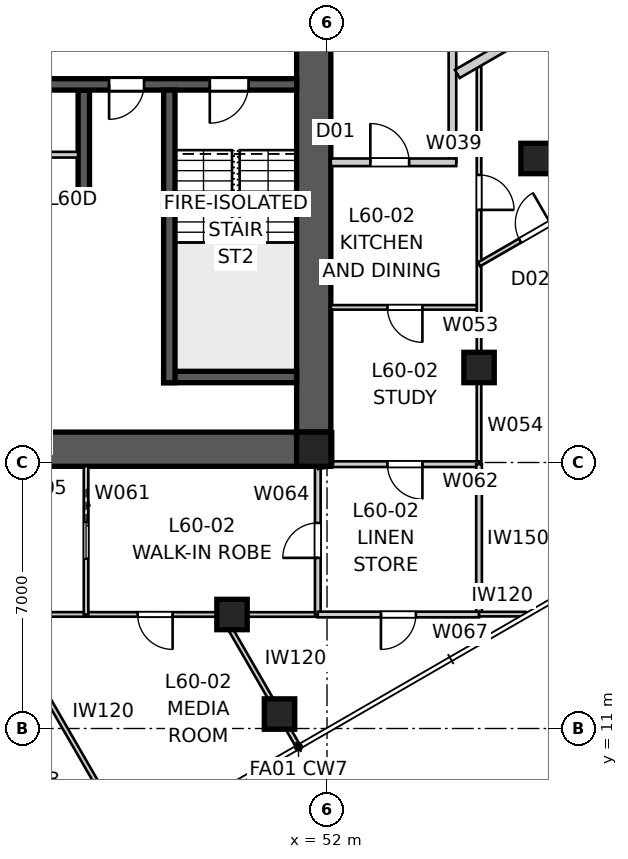
"""IFC4 building model, lengths in metres.
Left out: names, types, materials, properties, quantities, classifications, styles, units other than length and angle.
Written with IfcOpenShell. Run it as: python <this file> out.ifc"""

import sys

from ifc_helpers import new_model, si_unit, direction, frame, frame_2d, origin, origin_2d, place, context, subcontext, project, spatial, polyline, rectangle, outline, extrude, element, fill, save


model = new_model("IFC4")
c1 = context("Model", 3, precision=1e-05, world=origin(), true_north=direction((0.0, 1.0)))
c2 = subcontext(c1, "Body", "Model", "MODEL_VIEW")
j1 = project(units=[si_unit("LENGTHUNIT", "METRE"), si_unit("PLANEANGLEUNIT", "RADIAN")], contexts=[c1])
p1 = place(None, origin())
s1 = spatial("IfcSite", under=j1, at=p1, CompositionType="ELEMENT")
p2 = place(p1, origin())
s2 = spatial("IfcBuilding", under=s1, at=p2, CompositionType="ELEMENT")
p3 = place(p2, frame((0.0, 0.0, 218.4)))
s3 = spatial("IfcBuildingStorey", under=s2, at=p3, CompositionType="ELEMENT", Elevation=218.4)
p4 = place(p3, frame((51.2, 18.35, 0.0), z_axis=(0.0, 0.0, 1.0), x_axis=(-1.0, 0.0, 0.0)))
e1 = element("IfcWall", 1, at=p4, inside=s3, PredefinedType="SHEAR", context=c2, shape_type="SweptSolid", body=[
    extrude(outline(polyline([(0.0, -0.45), (22.4, -0.45), (22.4, -0.025), (22.85, -0.025), (22.85, 0.025), (22.4, 0.025), (22.4, 0.45), (0.0, 0.45), (0.0, 0.025), (-0.45, 0.025), (-0.45, -0.025), (0.0, -0.025), (0.0, -0.45)])), origin(), (0.0, 0.0, 1.0), 3.4),
])
p5 = place(p3, frame((51.65, 18.8, 0.0), z_axis=(0.0, 0.0, 1.0), x_axis=(0.0, 1.0, 0.0)))
e2 = element("IfcWall", 2, at=p5, inside=s3, PredefinedType="SHEAR", context=c2, shape_type="SweptSolid", body=[
    extrude(outline(polyline([(0.0, -0.45), (22.4, -0.45), (22.4, -0.025), (22.85, -0.025), (22.85, 0.025), (22.4, 0.025), (22.4, 0.45), (0.0, 0.45), (0.0, 0.025), (-0.45, 0.025), (-0.45, -0.025), (0.0, -0.025), (0.0, -0.45)])), origin(), (0.0, 0.0, 1.0), 3.4),
])
p6 = place(p5, frame((11.14, 0.0, 0.0)))
e3 = element("IfcOpeningElement", 3, at=p6, cuts=e2, PredefinedType="OPENING", context=c2, shape_type="SweptSolid", body=[
    extrude(rectangle(XDim=1.02, YDim=2.4, at=frame_2d((0.51, 1.2))), frame((0.0, 0.46, 0.0), z_axis=(0.0, -1.0, 0.0), x_axis=(1.0, 0.0, 0.0)), (0.0, 0.0, 1.0), 0.92),
])
p7 = place(p3, frame((51.2, 27.95, 0.0), z_axis=(0.0, 0.0, 1.0), x_axis=(-1.0, 0.0, 0.0)))
e4 = element("IfcWall", 4, at=p7, inside=s3, PredefinedType="SHEAR", context=c2, shape_type="SweptSolid", body=[
    extrude(rectangle(XDim=22.4, YDim=0.3, at=frame_2d((11.2, 0.0))), origin(), (0.0, 0.0, 1.0), 3.4),
])
p8 = place(p7, frame((19.04, 0.0, 0.0)))
e5 = element("IfcOpeningElement", 5, at=p8, cuts=e4, PredefinedType="OPENING", context=c2, shape_type="SweptSolid", body=[
    extrude(rectangle(XDim=0.92, YDim=2.1, at=frame_2d((0.46, 1.05))), frame((0.0, 0.16, 0.0), z_axis=(0.0, -1.0, 0.0), x_axis=(1.0, 0.0, 0.0)), (0.0, 0.0, 1.0), 0.32),
])
p9 = place(p7, frame((1.265, 0.0, 0.0)))
e6 = element("IfcOpeningElement", 6, at=p9, cuts=e4, PredefinedType="OPENING", context=c2, shape_type="SweptSolid", body=[
    extrude(rectangle(XDim=1.02, YDim=2.1, at=frame_2d((0.51, 1.05))), frame((0.0, 0.16, 0.0), z_axis=(0.0, -1.0, 0.0), x_axis=(1.0, 0.0, 0.0)), (0.0, 0.0, 1.0), 0.32),
])
p10 = place(p7, frame((4.015, 0.0, 0.0)))
e7 = element("IfcOpeningElement", 7, at=p10, cuts=e4, PredefinedType="OPENING", context=c2, shape_type="SweptSolid", body=[
    extrude(rectangle(XDim=0.92, YDim=2.1, at=frame_2d((0.46, 1.05))), frame((0.0, 0.16, 0.0), z_axis=(0.0, -1.0, 0.0), x_axis=(1.0, 0.0, 0.0)), (0.0, 0.0, 1.0), 0.32),
])
p11 = place(p7, frame((8.89, 0.0, 0.0)))
e8 = element("IfcOpeningElement", 8, at=p11, cuts=e4, PredefinedType="OPENING", context=c2, shape_type="SweptSolid", body=[
    extrude(rectangle(XDim=0.92, YDim=2.1, at=frame_2d((0.46, 1.05))), frame((0.0, 0.16, 0.0), z_axis=(0.0, -1.0, 0.0), x_axis=(1.0, 0.0, 0.0)), (0.0, 0.0, 1.0), 0.32),
])
p12 = place(p7, frame((6.565, 0.0, 0.0)))
e9 = element("IfcOpeningElement", 9, at=p12, cuts=e4, PredefinedType="OPENING", context=c2, shape_type="SweptSolid", body=[
    extrude(rectangle(XDim=0.92, YDim=2.1, at=frame_2d((0.46, 1.05))), frame((0.0, 0.16, 0.0), z_axis=(0.0, -1.0, 0.0), x_axis=(1.0, 0.0, 0.0)), (0.0, 0.0, 1.0), 0.32),
])
p13 = place(p7, frame((12.05, 0.0, 0.0)))
e10 = element("IfcOpeningElement", 10, at=p13, cuts=e4, PredefinedType="OPENING", context=c2, shape_type="SweptSolid", body=[
    extrude(rectangle(XDim=1.1, YDim=2.1, at=frame_2d((0.55, 1.05))), frame((0.0, 0.16, 0.0), z_axis=(0.0, -1.0, 0.0), x_axis=(1.0, 0.0, 0.0)), (0.0, 0.0, 1.0), 0.32),
])
p14 = place(p7, frame((14.85, 0.0, 0.0)))
e11 = element("IfcOpeningElement", 11, at=p14, cuts=e4, PredefinedType="OPENING", context=c2, shape_type="SweptSolid", body=[
    extrude(rectangle(XDim=1.1, YDim=2.1, at=frame_2d((0.55, 1.05))), frame((0.0, 0.16, 0.0), z_axis=(0.0, -1.0, 0.0), x_axis=(1.0, 0.0, 0.0)), (0.0, 0.0, 1.0), 0.32),
])
p15 = place(p3, frame((45.75, 24.85, 0.0), z_axis=(0.0, 0.0, 1.0), x_axis=(-1.0, 0.0, 0.0)))
e12 = element("IfcWall", 12, at=p15, inside=s3, PredefinedType="SHEAR", context=c2, shape_type="SweptSolid", body=[
    extrude(rectangle(XDim=11.5, YDim=0.3, at=frame_2d((5.75, 0.0))), origin(), (0.0, 0.0, 1.0), 3.4),
])
p16 = place(p3, frame((45.6, 27.8, 0.0), z_axis=(0.0, 0.0, 1.0), x_axis=(0.0, -1.0, 0.0)))
e13 = element("IfcWall", 13, at=p16, inside=s3, PredefinedType="SHEAR", context=c2, shape_type="SweptSolid", body=[
    extrude(rectangle(XDim=2.8, YDim=0.3, at=frame_2d((1.4, 0.0))), origin(), (0.0, 0.0, 1.0), 3.4),
])
p17 = place(p3, frame((47.85, 27.8, 0.0), z_axis=(0.0, 0.0, 1.0), x_axis=(0.0, -1.0, 0.0)))
e14 = element("IfcWall", 14, at=p17, inside=s3, PredefinedType="SHEAR", context=c2, shape_type="SweptSolid", body=[
    extrude(rectangle(XDim=7.7, YDim=0.3, at=frame_2d((3.85, 0.0))), origin(), (0.0, 0.0, 1.0), 3.4),
])
p18 = place(p3, frame((51.2, 20.25, 0.0), z_axis=(0.0, 0.0, 1.0), x_axis=(-1.0, 0.0, 0.0)))
e15 = element("IfcWall", 15, at=p18, inside=s3, PredefinedType="SHEAR", context=c2, shape_type="SweptSolid", body=[
    extrude(rectangle(XDim=3.5, YDim=0.3, at=frame_2d((1.75, 0.0))), origin(), (0.0, 0.0, 1.0), 3.4),
])
p19 = place(p3, frame((51.65, 18.35, 0.0), z_axis=(0.0, 0.0, 1.0), x_axis=(1.0, 0.0, 0.0)))
e16 = element("IfcColumn", 16, at=p19, inside=s3, PredefinedType="COLUMN", context=c2, shape_type="SweptSolid", body=[
    extrude(rectangle(XDim=0.9, YDim=0.9, at=origin_2d()), origin(), (0.0, 0.0, 1.0), 3.4),
])
for number, where, z_axis, x_axis in (
    (17, (50.75, 11.38, 0.0), (0.0, 0.0, 1.0), (1.0, 0.0, 0.0)),
    (18, (57.5, 26.0, 0.0), (0.0, 0.0, 1.0), (1.0, 0.0, 0.0)),
    (19, (49.5, 14.0, 0.0), (0.0, 0.0, 1.0), (1.0, 0.0, 0.0)),
    (20, (56.0, 20.5, 0.0), (0.0, 0.0, 1.0), (1.0, 0.0, 0.0)),
):
    element("IfcColumn", number, at=place(p3, frame(where, z_axis=z_axis, x_axis=x_axis)), inside=s3, PredefinedType="COLUMN", context=c2, shape_type="SweptSolid", body=[
        extrude(rectangle(XDim=0.8, YDim=0.8, at=origin_2d()), origin(), (0.0, 0.0, 1.0), 3.4),
    ])
p20 = place(p3, frame((55.3, 25.9, 0.0), z_axis=(0.0, 0.0, 1.0), x_axis=(0.0, 1.0, 0.0)))
e21 = element("IfcWall", 21, at=p20, inside=s3, PredefinedType="PARTITIONING", context=c2, shape_type="SweptSolid", body=[
    extrude(rectangle(XDim=8.2, YDim=0.2, at=frame_2d((4.1, 0.0))), origin(), (0.0, 0.0, 1.0), 3.25),
])
p21 = place(p3, frame((52.1, 25.9, 0.0), z_axis=(0.0, 0.0, 1.0), x_axis=(1.0, 0.0, 0.0)))
e22 = element("IfcWall", 22, at=p21, inside=s3, PredefinedType="PARTITIONING", context=c2, shape_type="SweptSolid", body=[
    extrude(rectangle(XDim=3.3, YDim=0.2, at=frame_2d((1.65, 0.0))), origin(), (0.0, 0.0, 1.0), 3.25),
])
p22 = place(p21, frame((1.04, 0.0, 0.0)))
e23 = element("IfcOpeningElement", 23, at=p22, cuts=e22, PredefinedType="OPENING", context=c2, shape_type="SweptSolid", body=[
    extrude(rectangle(XDim=1.02, YDim=2.34, at=frame_2d((0.51, 1.17))), frame((0.0, 0.11, 0.0), z_axis=(0.0, -1.0, 0.0), x_axis=(1.0, 0.0, 0.0)), (0.0, 0.0, 1.0), 0.22),
])
p23 = place(p3, frame((64.111, 33.239, 0.0), z_axis=(0.0, 0.0, 1.0), x_axis=(-0.866024190901, -0.50000210077, 0.0)))
e24 = element("IfcWall", 24, at=p23, inside=s3, PredefinedType="PARTITIONING", context=c2, shape_type="SweptSolid", body=[
    extrude(rectangle(XDim=10.026, YDim=0.25, at=frame_2d((5.013, 0.0))), origin(), (0.0, 0.0, 1.0), 3.25),
])
p24 = place(p23, frame((2.229, 0.0, 0.0)))
e25 = element("IfcOpeningElement", 25, at=p24, cuts=e24, PredefinedType="OPENING", context=c2, shape_type="SweptSolid", body=[
    extrude(rectangle(XDim=0.92, YDim=2.34, at=frame_2d((0.46, 1.17))), frame((0.0, 0.135, 0.0), z_axis=(0.0, -1.0, 0.0), x_axis=(1.0, 0.0, 0.0)), (0.0, 0.0, 1.0), 0.27),
])
p25 = place(p3, frame((56.0, 22.083, 0.0), z_axis=(0.0, 0.0, 1.0), x_axis=(-1.0, 0.0, 0.0)))
e26 = element("IfcWall", 26, at=p25, inside=s3, PredefinedType="PARTITIONING", context=c2, shape_type="SweptSolid", body=[
    extrude(rectangle(XDim=3.9, YDim=0.12, at=frame_2d((1.95, 0.0))), origin(), (0.0, 0.0, 1.0), 3.25),
])
p26 = place(p25, frame((1.49, 0.0, 0.0)))
e27 = element("IfcOpeningElement", 27, at=p26, cuts=e26, PredefinedType="OPENING", context=c2, shape_type="SweptSolid", body=[
    extrude(rectangle(XDim=0.92, YDim=2.34, at=frame_2d((0.46, 1.17))), frame((0.0, 0.07, 0.0), z_axis=(0.0, -1.0, 0.0), x_axis=(1.0, 0.0, 0.0)), (0.0, 0.0, 1.0), 0.14),
])
p27 = place(p3, frame((56.0, 28.557, 0.0), z_axis=(0.0, 0.0, 1.0), x_axis=(0.0, -1.0, 0.0)))
e28 = element("IfcWall", 28, at=p27, inside=s3, PredefinedType="PARTITIONING", context=c2, shape_type="SweptSolid", body=[
    extrude(rectangle(XDim=10.601, YDim=0.12, at=frame_2d((5.3, 0.0))), origin(), (0.0, 0.0, 1.0), 2.55),
])
p28 = place(p27, frame((2.989, 0.0, 0.0)))
e29 = element("IfcOpeningElement", 29, at=p28, cuts=e28, PredefinedType="OPENING", context=c2, shape_type="SweptSolid", body=[
    extrude(rectangle(XDim=0.92, YDim=2.34, at=frame_2d((0.46, 1.17))), frame((0.0, 0.07, 0.0), z_axis=(0.0, -1.0, 0.0), x_axis=(1.0, 0.0, 0.0)), (0.0, 0.0, 1.0), 0.14),
])
p29 = place(p3, frame((51.757, 14.0, 0.0), z_axis=(0.0, 0.0, 1.0), x_axis=(-0.999999938148, 0.000351716958, 0.0)))
e30 = element("IfcWall", 30, at=p29, inside=s3, PredefinedType="PARTITIONING", context=c2, shape_type="SweptSolid", body=[
    extrude(rectangle(XDim=28.46, YDim=0.12, at=frame_2d((14.23, 0.0))), origin(), (0.0, 0.0, 1.0), 2.55),
])
p30 = place(p29, frame((3.82, 0.0, 0.0)))
e31 = element("IfcOpeningElement", 31, at=p30, cuts=e30, PredefinedType="OPENING", context=c2, shape_type="SweptSolid", body=[
    extrude(rectangle(XDim=0.92, YDim=2.34, at=frame_2d((0.46, 1.17))), frame((0.0, 0.07, 0.0), z_axis=(0.0, -1.0, 0.0), x_axis=(1.0, 0.0, 0.0)), (0.0, 0.0, 1.0), 0.14),
])
p31 = place(p29, frame((9.17, 0.0, 0.0)))
e32 = element("IfcOpeningElement", 32, at=p31, cuts=e30, PredefinedType="OPENING", context=c2, shape_type="SweptSolid", body=[
    extrude(rectangle(XDim=0.96, YDim=2.1, at=frame_2d((0.48, 1.05))), frame((0.0, 0.07, 0.0), z_axis=(0.0, -1.0, 0.0), x_axis=(1.0, 0.0, 0.0)), (0.0, 0.0, 1.0), 0.14),
])
p32 = place(p29, frame((13.68, 0.0, 0.0)))
e33 = element("IfcOpeningElement", 33, at=p32, cuts=e30, PredefinedType="OPENING", context=c2, shape_type="SweptSolid", body=[
    extrude(rectangle(XDim=0.96, YDim=2.1, at=frame_2d((0.48, 1.05))), frame((0.0, 0.07, 0.0), z_axis=(0.0, -1.0, 0.0), x_axis=(1.0, 0.0, 0.0)), (0.0, 0.0, 1.0), 0.14),
])
p33 = place(p29, frame((23.854, 0.0, 0.0)))
e34 = element("IfcOpeningElement", 34, at=p33, cuts=e30, PredefinedType="OPENING", context=c2, shape_type="SweptSolid", body=[
    extrude(rectangle(XDim=0.92, YDim=2.34, at=frame_2d((0.46, 1.17))), frame((0.0, 0.07, 0.0), z_axis=(0.0, -1.0, 0.0), x_axis=(1.0, 0.0, 0.0)), (0.0, 0.0, 1.0), 0.14),
])
p34 = place(p3, frame((45.659, 17.9, 0.0), z_axis=(0.0, 0.0, 1.0), x_axis=(0.0, -1.0, 0.0)))
e35 = element("IfcWall", 35, at=p34, inside=s3, PredefinedType="PARTITIONING", context=c2, shape_type="SweptSolid", body=[
    extrude(rectangle(XDim=3.9, YDim=0.12, at=frame_2d((1.95, 0.0))), origin(), (0.0, 0.0, 1.0), 3.25),
])
p35 = place(p34, frame((1.47, 0.0, 0.0)))
e36 = element("IfcOpeningElement", 36, at=p35, cuts=e35, PredefinedType="OPENING", context=c2, shape_type="SweptSolid", body=[
    extrude(rectangle(XDim=0.96, YDim=2.1, at=frame_2d((0.48, 1.05))), frame((0.0, 0.07, 0.0), z_axis=(0.0, -1.0, 0.0), x_axis=(1.0, 0.0, 0.0)), (0.0, 0.0, 1.0), 0.14),
])
p36 = place(p3, frame((56.0, 17.956, 0.0), z_axis=(0.0, 0.0, 1.0), x_axis=(-1.0, 0.0, 0.0)))
e37 = element("IfcWall", 37, at=p36, inside=s3, PredefinedType="SOLIDWALL", context=c2, shape_type="SweptSolid", body=[
    extrude(rectangle(XDim=3.9, YDim=0.15, at=frame_2d((1.95, 0.0))), origin(), (0.0, 0.0, 1.0), 3.25),
])
p37 = place(p36, frame((1.49, 0.0, 0.0)))
e38 = element("IfcOpeningElement", 38, at=p37, cuts=e37, PredefinedType="OPENING", context=c2, shape_type="SweptSolid", body=[
    extrude(rectangle(XDim=0.92, YDim=2.1, at=frame_2d((0.46, 1.05))), frame((0.0, 0.085, 0.0), z_axis=(0.0, -1.0, 0.0), x_axis=(1.0, 0.0, 0.0)), (0.0, 0.0, 1.0), 0.17),
])
p38 = place(p3, frame((52.1, 17.956, 0.0), z_axis=(0.0, 0.0, 1.0), x_axis=(0.0, 1.0, 0.0)))
e39 = element("IfcWall", 39, at=p38, inside=s3, PredefinedType="PARTITIONING", context=c2, shape_type="SweptSolid", body=[
    extrude(rectangle(XDim=0.864, YDim=0.12, at=frame_2d((0.432, 0.0))), origin(), (0.0, 0.0, 1.0), 3.25),
])
p39 = place(p3, frame((51.757, 14.0, 0.0), z_axis=(0.0, 0.0, 1.0), x_axis=(0.0, 1.0, 0.0)))
e40 = element("IfcWall", 40, at=p39, inside=s3, PredefinedType="SOLIDWALL", context=c2, shape_type="SweptSolid", body=[
    extrude(rectangle(XDim=3.9, YDim=0.15, at=frame_2d((1.95, 0.0))), origin(), (0.0, 0.0, 1.0), 3.25),
])
p40 = place(p39, frame((1.49, 0.0, 0.0)))
e41 = element("IfcOpeningElement", 41, at=p40, cuts=e40, PredefinedType="OPENING", context=c2, shape_type="SweptSolid", body=[
    extrude(rectangle(XDim=0.92, YDim=2.1, at=frame_2d((0.46, 1.05))), frame((0.0, 0.085, 0.0), z_axis=(0.0, -1.0, 0.0), x_axis=(1.0, 0.0, 0.0)), (0.0, 0.0, 1.0), 0.17),
])
p41 = place(p3, frame((56.0, 17.956, 0.0), z_axis=(0.0, 0.0, 1.0), x_axis=(0.0, -1.0, 0.0)))
e42 = element("IfcWall", 42, at=p41, inside=s3, PredefinedType="SOLIDWALL", context=c2, shape_type="SweptSolid", body=[
    extrude(rectangle(XDim=3.956, YDim=0.15, at=frame_2d((1.978, 0.0))), origin(), (0.0, 0.0, 1.0), 3.25),
])
p42 = place(p3, frame((56.0, 14.0, 0.0), z_axis=(0.0, 0.0, 1.0), x_axis=(-1.0, 0.0, 0.0)))
e43 = element("IfcWall", 43, at=p42, inside=s3, PredefinedType="SOLIDWALL", context=c2, shape_type="SweptSolid", body=[
    extrude(rectangle(XDim=4.243, YDim=0.15, at=frame_2d((2.122, 0.0))), origin(), (0.0, 0.0, 1.0), 3.25),
])
p43 = place(p42, frame((1.661, 0.0, 0.0)))
e44 = element("IfcOpeningElement", 44, at=p43, cuts=e43, PredefinedType="OPENING", context=c2, shape_type="SweptSolid", body=[
    extrude(rectangle(XDim=0.92, YDim=2.34, at=frame_2d((0.46, 1.17))), frame((0.0, 0.085, 0.0), z_axis=(0.0, -1.0, 0.0), x_axis=(1.0, 0.0, 0.0)), (0.0, 0.0, 1.0), 0.17),
])
p44 = place(p3, frame((57.225, 14.01, 0.0), z_axis=(0.0, 0.0, 1.0), x_axis=(-1.0, 0.0, 0.0)))
e45 = element("IfcWall", 45, at=p44, inside=s3, PredefinedType="PARTITIONING", context=c2, shape_type="SweptSolid", body=[
    extrude(rectangle(XDim=1.225, YDim=0.12, at=frame_2d((0.612, 0.0))), origin(), (0.0, 0.0, 1.0), 3.25),
])
p45 = place(p3, frame((56.0, 23.216, 0.0), z_axis=(0.0, 0.0, 1.0), x_axis=(0.866023917076, 0.500002575046, 0.0)))
e46 = element("IfcWall", 46, at=p45, inside=s3, PredefinedType="PARTITIONING", context=c2, shape_type="SweptSolid", body=[
    extrude(rectangle(XDim=11.996, YDim=0.12, at=frame_2d((5.998, 0.0))), origin(), (0.0, 0.0, 1.0), 3.25),
])
p46 = place(p45, frame((1.245, 0.0, 0.0)))
e47 = element("IfcOpeningElement", 47, at=p46, cuts=e46, PredefinedType="OPENING", context=c2, shape_type="SweptSolid", body=[
    extrude(rectangle(XDim=0.92, YDim=2.34, at=frame_2d((0.46, 1.17))), frame((0.0, 0.07, 0.0), z_axis=(0.0, -1.0, 0.0), x_axis=(1.0, 0.0, 0.0)), (0.0, 0.0, 1.0), 0.14),
])
p47 = place(p45, frame((4.599, 0.0, 0.0)))
e48 = element("IfcOpeningElement", 48, at=p47, cuts=e46, PredefinedType="OPENING", context=c2, shape_type="SweptSolid", body=[
    extrude(rectangle(XDim=0.92, YDim=2.34, at=frame_2d((0.46, 1.17))), frame((0.0, 0.07, 0.0), z_axis=(0.0, -1.0, 0.0), x_axis=(1.0, 0.0, 0.0)), (0.0, 0.0, 1.0), 0.14),
])
p48 = place(p45, frame((9.394, 0.0, 0.0)))
e49 = element("IfcOpeningElement", 49, at=p48, cuts=e46, PredefinedType="OPENING", context=c2, shape_type="SweptSolid", body=[
    extrude(rectangle(XDim=0.92, YDim=2.34, at=frame_2d((0.46, 1.17))), frame((0.0, 0.07, 0.0), z_axis=(0.0, -1.0, 0.0), x_axis=(1.0, 0.0, 0.0)), (0.0, 0.0, 1.0), 0.14),
])
p49 = place(p3, frame((43.507, 13.775, 0.0), z_axis=(0.0, 0.0, 1.0), x_axis=(0.500013541994, -0.866017585169, 0.0)))
e50 = element("IfcWall", 50, at=p49, inside=s3, PredefinedType="PARTITIONING", context=c2, shape_type="SweptSolid", body=[
    extrude(rectangle(XDim=6.655, YDim=0.12, at=frame_2d((3.328, 0.0))), origin(), (0.0, 0.0, 1.0), 3.25),
])
p50 = place(p3, frame((51.23, 10.549, 0.0), z_axis=(0.0, 0.0, 1.0), x_axis=(-0.500007073895, 0.866021319631, 0.0)))
e51 = element("IfcWall", 51, at=p50, inside=s3, PredefinedType="PARTITIONING", context=c2, shape_type="SweptSolid", body=[
    extrude(rectangle(XDim=3.985, YDim=0.12, at=frame_2d((1.992, 0.0))), origin(), (0.0, 0.0, 1.0), 3.25),
])
p51 = place(p3, frame((51.757, 17.9, 0.0), z_axis=(0.0, 0.0, 1.0), x_axis=(0.986864404584, 0.161550756622, 0.0)))
e52 = element("IfcWall", 52, at=p51, inside=s3, PredefinedType="SOLIDWALL", context=c2, shape_type="SweptSolid", body=[
    extrude(rectangle(XDim=0.348, YDim=0.15, at=frame_2d((0.174, 0.0))), origin(), (0.0, 0.0, 1.0), 3.25),
])
p52 = place(p3, frame((40.1, 26.1, 0.0), z_axis=(0.0, 0.0, 1.0), x_axis=(1.0, 0.0, 0.0)))
e53 = element("IfcWall", 53, at=p52, inside=s3, PredefinedType="SOLIDWALL", context=c2, shape_type="SweptSolid", body=[
    extrude(rectangle(XDim=5.35, YDim=0.15, at=frame_2d((2.675, 0.0))), origin(), (0.0, 0.0, 1.0), 3.25),
])
p53 = place(p52, frame((2.215, 0.0, 0.0)))
e54 = element("IfcOpeningElement", 54, at=p53, cuts=e53, PredefinedType="OPENING", context=c2, shape_type="SweptSolid", body=[
    extrude(rectangle(XDim=0.92, YDim=2.1, at=frame_2d((0.46, 1.05))), frame((0.0, 0.085, 0.0), z_axis=(0.0, -1.0, 0.0), x_axis=(1.0, 0.0, 0.0)), (0.0, 0.0, 1.0), 0.17),
])
p54 = place(p9, origin())
e55 = element("IfcDoor", 55, at=p54, inside=s3, OperationType="SINGLE_SWING_RIGHT", PredefinedType="DOOR", context=c2, shape_type="SweptSolid", body=[
    extrude(rectangle(XDim=1.02, YDim=2.1, at=frame_2d((0.51, 1.05))), frame((0.0, 0.025, 0.0), z_axis=(0.0, -1.0, 0.0), x_axis=(1.0, 0.0, 0.0)), (0.0, 0.0, 1.0), 0.05),
])
fill(e6, e55)
p55 = place(p10, origin())
e56 = element("IfcDoor", 56, at=p55, inside=s3, OperationType="SINGLE_SWING_RIGHT", PredefinedType="DOOR", context=c2, shape_type="SweptSolid", body=[
    extrude(rectangle(XDim=0.92, YDim=2.1, at=frame_2d((0.46, 1.05))), frame((0.0, 0.025, 0.0), z_axis=(0.0, -1.0, 0.0), x_axis=(1.0, 0.0, 0.0)), (0.0, 0.0, 1.0), 0.05),
])
fill(e7, e56)
p56 = place(p22, origin())
e57 = element("IfcDoor", 57, at=p56, inside=s3, OperationType="SINGLE_SWING_LEFT", PredefinedType="DOOR", context=c2, shape_type="SweptSolid", body=[
    extrude(rectangle(XDim=1.02, YDim=2.34, at=frame_2d((0.51, 1.17))), frame((0.0, 0.025, 0.0), z_axis=(0.0, -1.0, 0.0), x_axis=(1.0, 0.0, 0.0)), (0.0, 0.0, 1.0), 0.05),
])
fill(e23, e57)
p57 = place(p28, origin())
e58 = element("IfcDoor", 58, at=p57, inside=s3, OperationType="SINGLE_SWING_RIGHT", PredefinedType="DOOR", context=c2, shape_type="SweptSolid", body=[
    extrude(rectangle(XDim=0.92, YDim=2.34, at=frame_2d((0.46, 1.17))), frame((0.0, 0.025, 0.0), z_axis=(0.0, -1.0, 0.0), x_axis=(1.0, 0.0, 0.0)), (0.0, 0.0, 1.0), 0.05),
])
fill(e29, e58)
p58 = place(p26, origin())
e59 = element("IfcDoor", 59, at=p58, inside=s3, OperationType="SINGLE_SWING_LEFT", PredefinedType="DOOR", context=c2, shape_type="SweptSolid", body=[
    extrude(rectangle(XDim=0.92, YDim=2.34, at=frame_2d((0.46, 1.17))), frame((0.0, 0.025, 0.0), z_axis=(0.0, -1.0, 0.0), x_axis=(1.0, 0.0, 0.0)), (0.0, 0.0, 1.0), 0.05),
])
fill(e27, e59)
p59 = place(p46, origin())
e60 = element("IfcDoor", 60, at=p59, inside=s3, OperationType="SINGLE_SWING_RIGHT", PredefinedType="DOOR", context=c2, shape_type="SweptSolid", body=[
    extrude(rectangle(XDim=0.92, YDim=2.34, at=frame_2d((0.46, 1.17))), frame((0.0, 0.025, 0.0), z_axis=(0.0, -1.0, 0.0), x_axis=(1.0, 0.0, 0.0)), (0.0, 0.0, 1.0), 0.05),
])
fill(e47, e60)
p60 = place(p37, origin())
e61 = element("IfcDoor", 61, at=p60, inside=s3, OperationType="SINGLE_SWING_LEFT", PredefinedType="DOOR", context=c2, shape_type="SweptSolid", body=[
    extrude(rectangle(XDim=0.92, YDim=2.1, at=frame_2d((0.46, 1.05))), frame((0.0, 0.025, 0.0), z_axis=(0.0, -1.0, 0.0), x_axis=(1.0, 0.0, 0.0)), (0.0, 0.0, 1.0), 0.05),
])
fill(e38, e61)
p61 = place(p43, origin())
e62 = element("IfcDoor", 62, at=p61, inside=s3, OperationType="SINGLE_SWING_RIGHT", PredefinedType="DOOR", context=c2, shape_type="SweptSolid", body=[
    extrude(rectangle(XDim=0.92, YDim=2.34, at=frame_2d((0.46, 1.17))), frame((0.0, 0.025, 0.0), z_axis=(0.0, -1.0, 0.0), x_axis=(1.0, 0.0, 0.0)), (0.0, 0.0, 1.0), 0.05),
])
fill(e44, e62)
p62 = place(p40, origin())
e63 = element("IfcDoor", 63, at=p62, inside=s3, OperationType="SINGLE_SWING_LEFT", PredefinedType="DOOR", context=c2, shape_type="SweptSolid", body=[
    extrude(rectangle(XDim=0.92, YDim=2.1, at=frame_2d((0.46, 1.05))), frame((0.0, 0.025, 0.0), z_axis=(0.0, -1.0, 0.0), x_axis=(1.0, 0.0, 0.0)), (0.0, 0.0, 1.0), 0.05),
])
fill(e41, e63)
p63 = place(p35, origin())
e64 = element("IfcDoor", 64, at=p63, inside=s3, OperationType="SLIDING_TO_LEFT", PredefinedType="DOOR", context=c2, shape_type="SweptSolid", body=[
    extrude(rectangle(XDim=0.96, YDim=2.1, at=frame_2d((0.48, 1.05))), frame((0.0, 0.025, 0.0), z_axis=(0.0, -1.0, 0.0), x_axis=(1.0, 0.0, 0.0)), (0.0, 0.0, 1.0), 0.05),
])
fill(e36, e64)
p64 = place(p30, origin())
e65 = element("IfcDoor", 65, at=p64, inside=s3, OperationType="SINGLE_SWING_LEFT", PredefinedType="DOOR", context=c2, shape_type="SweptSolid", body=[
    extrude(rectangle(XDim=0.92, YDim=2.34, at=frame_2d((0.46, 1.17))), frame((0.0, 0.025, 0.0), z_axis=(0.0, -1.0, 0.0), x_axis=(1.0, 0.0, 0.0)), (0.0, 0.0, 1.0), 0.05),
])
fill(e31, e65)
save(model, sys.argv[1])
